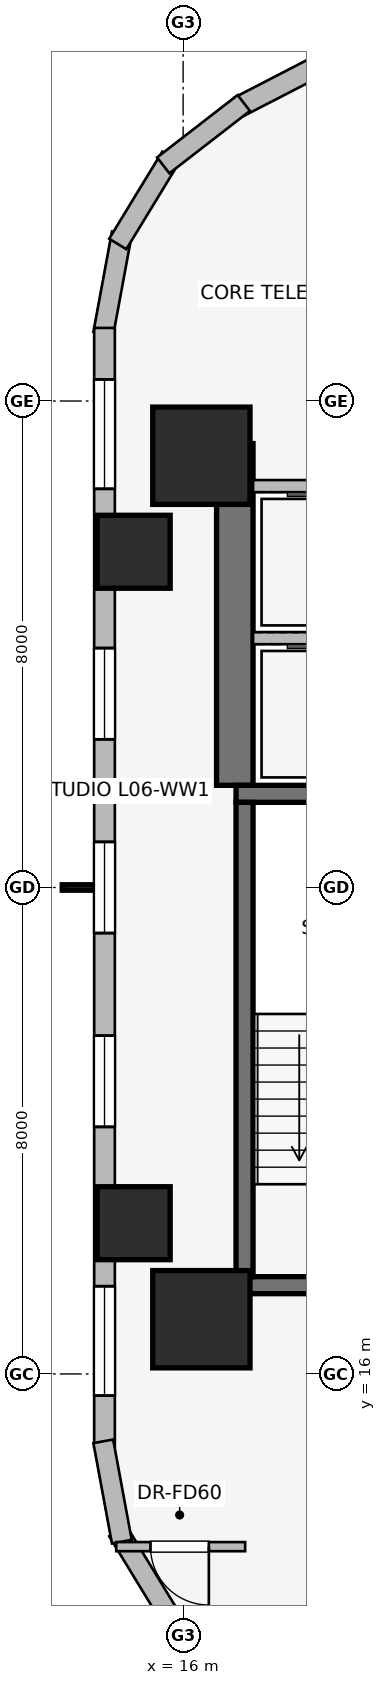
"""IFC4 building model, lengths in metres.
Left out: names, types, materials, properties, quantities, classifications, styles, units other than length and angle.
Written with IfcOpenShell. Run it as: python <this file> out.ifc"""

import sys

from ifc_helpers import new_model, si_unit, direction, frame, frame_2d, origin, origin_2d, place, context, subcontext, project, spatial, rectangle, extrude, element, fill, save


model = new_model("IFC4")
c1 = context("Model", 3, precision=1e-05, world=origin(), true_north=direction((0.0, 1.0)))
c2 = subcontext(c1, "Body", "Model", "MODEL_VIEW")
j1 = project(units=[si_unit("LENGTHUNIT", "METRE"), si_unit("PLANEANGLEUNIT", "RADIAN")], contexts=[c1])
p1 = place(None, origin())
s1 = spatial("IfcSite", under=j1, at=p1, CompositionType="ELEMENT")
p2 = place(p1, origin())
s2 = spatial("IfcBuilding", under=s1, at=p2, CompositionType="ELEMENT")
p3 = place(p2, frame((0.0, 0.0, 27.0)))
s3 = spatial("IfcBuildingStorey", under=s2, at=p3, CompositionType="ELEMENT", Elevation=27.0)
p4 = place(p3, frame((16.85, 25.68, 0.0), z_axis=(0.0, 0.0, 1.0), x_axis=(0.0, 1.0, 0.0)))
e1 = element("IfcWall", 1, at=p4, inside=s3, PredefinedType="SHEAR", context=c2, shape_type="SweptSolid", body=[
    extrude(rectangle(XDim=5.62, YDim=0.6, at=frame_2d((2.81, 0.0))), origin(), (0.0, 0.0, 1.0), 3.65),
])
for number, where, z_axis, x_axis in (
    (2, (16.87, 17.46, 0.0), (0.0, 0.0, 1.0), (1.0, 0.0, 0.0)),
    (3, (20.63, 25.54, 0.0), (0.0, 0.0, 1.0), (-1.0, 0.0, 0.0)),
):
    element("IfcWall", number, at=place(p3, frame(where, z_axis=z_axis, x_axis=x_axis)), inside=s3, PredefinedType="SHEAR", context=c2, shape_type="SweptSolid", body=[
        extrude(rectangle(XDim=3.76, YDim=0.28, at=frame_2d((1.88, 0.0))), origin(), (0.0, 0.0, 1.0), 3.65),
    ])
p5 = place(p3, frame((17.01, 25.4, 0.0), z_axis=(0.0, 0.0, 1.0), x_axis=(0.0, -1.0, 0.0)))
e4 = element("IfcWall", 4, at=p5, inside=s3, PredefinedType="SHEAR", context=c2, shape_type="SweptSolid", body=[
    extrude(rectangle(XDim=7.8, YDim=0.28, at=frame_2d((3.9, 0.0))), origin(), (0.0, 0.0, 1.0), 3.65),
])
for number, where, z_axis, x_axis in (
    (5, (16.3, 16.9, 0.0), (0.0, 0.0, 1.0), (1.0, 0.0, 0.0)),
    (6, (16.3, 31.1, 0.0), (0.0, 0.0, 1.0), (1.0, 0.0, 0.0)),
):
    element("IfcColumn", number, at=place(p3, frame(where, z_axis=z_axis, x_axis=x_axis)), inside=s3, PredefinedType="COLUMN", context=c2, shape_type="SweptSolid", body=[
        extrude(rectangle(XDim=1.6, YDim=1.6, at=origin_2d()), origin(), (0.0, 0.0, 1.0), 3.65),
    ])
for number, where, z_axis, x_axis in (
    (7, (15.187, 29.521, -0.42), (0.0, 0.0, 1.0), (1.0, 0.0, 0.0)),
    (8, (15.187, 18.479, -0.42), (0.0, 0.0, 1.0), (1.0, 0.0, 0.0)),
):
    element("IfcColumn", number, at=place(p3, frame(where, z_axis=z_axis, x_axis=x_axis)), inside=s3, PredefinedType="COLUMN", context=c2, shape_type="SweptSolid", body=[
        extrude(rectangle(XDim=1.2, YDim=1.2, at=origin_2d()), origin(), (0.0, 0.0, 1.0), 4.07),
    ])
p6 = place(p3, frame((16.924, 36.841, 0.0), z_axis=(0.0, 0.0, 1.0), x_axis=(0.888634413993, 0.458616264721, 0.0)))
e9 = element("IfcWall", 9, at=p6, inside=s3, PredefinedType="STANDARD", context=c2, shape_type="SweptSolid", body=[
    extrude(rectangle(XDim=20.531, YDim=0.34, at=frame_2d((10.266, 0.0))), origin(), (0.0, 0.0, 1.0), 2.684),
])
p7 = place(p6, frame((2.161, 0.0, 0.75)))
e10 = element("IfcOpeningElement", 10, at=p7, cuts=e9, PredefinedType="OPENING", context=c2, shape_type="SweptSolid", body=[
    extrude(rectangle(XDim=1.05, YDim=1.4, at=frame_2d((0.525, 0.7))), frame((0.0, 0.18, 0.0), z_axis=(0.0, -1.0, 0.0), x_axis=(1.0, 0.0, 0.0)), (0.0, 0.0, 1.0), 0.36),
])
p8 = place(p6, frame((5.903, 0.0, 0.75)))
e11 = element("IfcOpeningElement", 11, at=p8, cuts=e9, PredefinedType="OPENING", context=c2, shape_type="SweptSolid", body=[
    extrude(rectangle(XDim=1.5, YDim=1.5, at=frame_2d((0.75, 0.75))), frame((0.0, 0.18, 0.0), z_axis=(0.0, -1.0, 0.0), x_axis=(1.0, 0.0, 0.0)), (0.0, 0.0, 1.0), 0.36),
])
p9 = place(p6, frame((9.516, 0.0, 0.75)))
e12 = element("IfcOpeningElement", 12, at=p9, cuts=e9, PredefinedType="OPENING", context=c2, shape_type="SweptSolid", body=[
    extrude(rectangle(XDim=1.5, YDim=1.5, at=frame_2d((0.75, 0.75))), frame((0.0, 0.18, 0.0), z_axis=(0.0, -1.0, 0.0), x_axis=(1.0, 0.0, 0.0)), (0.0, 0.0, 1.0), 0.36),
])
p10 = place(p6, frame((13.129, 0.0, 0.75)))
e13 = element("IfcOpeningElement", 13, at=p10, cuts=e9, PredefinedType="OPENING", context=c2, shape_type="SweptSolid", body=[
    extrude(rectangle(XDim=1.5, YDim=1.5, at=frame_2d((0.75, 0.75))), frame((0.0, 0.18, 0.0), z_axis=(0.0, -1.0, 0.0), x_axis=(1.0, 0.0, 0.0)), (0.0, 0.0, 1.0), 0.36),
])
p11 = place(p6, frame((17.476, 0.0, 0.75)))
e14 = element("IfcOpeningElement", 14, at=p11, cuts=e9, PredefinedType="OPENING", context=c2, shape_type="SweptSolid", body=[
    extrude(rectangle(XDim=1.05, YDim=1.4, at=frame_2d((0.525, 0.7))), frame((0.0, 0.18, 0.0), z_axis=(0.0, -1.0, 0.0), x_axis=(1.0, 0.0, 0.0)), (0.0, 0.0, 1.0), 0.36),
])
p12 = place(p3, frame((14.687, 33.108, 0.0), z_axis=(0.0, 0.0, 1.0), x_axis=(0.181714143354, 0.983351397063, 0.0)))
e15 = element("IfcWall", 15, at=p12, inside=s3, PredefinedType="STANDARD", context=c2, shape_type="SweptSolid", body=[
    extrude(rectangle(XDim=1.678, YDim=0.33, at=frame_2d((0.839, 0.0))), origin(), (0.0, 0.0, 1.0), 3.39),
])
p13 = place(p3, frame((14.925, 34.583, 0.0), z_axis=(0.0, 0.0, 1.0), x_axis=(0.520584129191, 0.853810379671, 0.0)))
e16 = element("IfcWall", 16, at=p13, inside=s3, PredefinedType="STANDARD", context=c2, shape_type="SweptSolid", body=[
    extrude(rectangle(XDim=1.677, YDim=0.33, at=frame_2d((0.838, 0.0))), origin(), (0.0, 0.0, 1.0), 3.39),
])
p14 = place(p3, frame((15.673, 35.875, 0.0), z_axis=(0.0, 0.0, 1.0), x_axis=(0.790691856293, 0.61221433207, 0.0)))
e17 = element("IfcWall", 17, at=p14, inside=s3, PredefinedType="STANDARD", context=c2, shape_type="SweptSolid", body=[
    extrude(rectangle(XDim=1.676, YDim=0.33, at=frame_2d((0.838, 0.0))), origin(), (0.0, 0.0, 1.0), 3.39),
])
p15 = place(p3, frame((14.707, 14.798, 0.0), z_axis=(0.0, 0.0, 1.0), x_axis=(0.0, 1.0, 0.0)))
e18 = element("IfcWall", 18, at=p15, inside=s3, PredefinedType="STANDARD", context=c2, shape_type="SweptSolid", body=[
    extrude(rectangle(XDim=18.404, YDim=0.34, at=frame_2d((9.202, 0.0))), origin(), (0.0, 0.0, 1.0), 2.684),
])
p16 = place(p15, frame((0.845, 0.0, 0.75)))
e19 = element("IfcOpeningElement", 19, at=p16, cuts=e18, PredefinedType="OPENING", context=c2, shape_type="SweptSolid", body=[
    extrude(rectangle(XDim=1.8, YDim=1.5, at=frame_2d((0.9, 0.75))), frame((0.0, 0.18, 0.0), z_axis=(0.0, -1.0, 0.0), x_axis=(1.0, 0.0, 0.0)), (0.0, 0.0, 1.0), 0.36),
])
p17 = place(p15, frame((5.265, 0.0, 0.75)))
e20 = element("IfcOpeningElement", 20, at=p17, cuts=e18, PredefinedType="OPENING", context=c2, shape_type="SweptSolid", body=[
    extrude(rectangle(XDim=1.5, YDim=1.5, at=frame_2d((0.75, 0.75))), frame((0.0, 0.18, 0.0), z_axis=(0.0, -1.0, 0.0), x_axis=(1.0, 0.0, 0.0)), (0.0, 0.0, 1.0), 0.36),
])
p18 = place(p15, frame((8.452, 0.0, 0.75)))
e21 = element("IfcOpeningElement", 21, at=p18, cuts=e18, PredefinedType="OPENING", context=c2, shape_type="SweptSolid", body=[
    extrude(rectangle(XDim=1.5, YDim=1.5, at=frame_2d((0.75, 0.75))), frame((0.0, 0.18, 0.0), z_axis=(0.0, -1.0, 0.0), x_axis=(1.0, 0.0, 0.0)), (0.0, 0.0, 1.0), 0.36),
])
p19 = place(p15, frame((11.639, 0.0, 0.75)))
e22 = element("IfcOpeningElement", 22, at=p19, cuts=e18, PredefinedType="OPENING", context=c2, shape_type="SweptSolid", body=[
    extrude(rectangle(XDim=1.5, YDim=1.5, at=frame_2d((0.75, 0.75))), frame((0.0, 0.18, 0.0), z_axis=(0.0, -1.0, 0.0), x_axis=(1.0, 0.0, 0.0)), (0.0, 0.0, 1.0), 0.36),
])
p20 = place(p15, frame((15.758, 0.0, 0.75)))
e23 = element("IfcOpeningElement", 23, at=p20, cuts=e18, PredefinedType="OPENING", context=c2, shape_type="SweptSolid", body=[
    extrude(rectangle(XDim=1.8, YDim=1.5, at=frame_2d((0.9, 0.75))), frame((0.0, 0.18, 0.0), z_axis=(0.0, -1.0, 0.0), x_axis=(1.0, 0.0, 0.0)), (0.0, 0.0, 1.0), 0.36),
])
p21 = place(p3, frame((16.998, 11.099, 0.0), z_axis=(0.0, 0.0, 1.0), x_axis=(-0.790691856293, 0.61221433207, 0.0)))
e24 = element("IfcWall", 24, at=p21, inside=s3, PredefinedType="STANDARD", context=c2, shape_type="SweptSolid", body=[
    extrude(rectangle(XDim=1.676, YDim=0.33, at=frame_2d((0.838, 0.0))), origin(), (0.0, 0.0, 1.0), 3.39),
])
p22 = place(p3, frame((15.798, 11.985, 0.0), z_axis=(0.0, 0.0, 1.0), x_axis=(-0.520584129191, 0.853810379671, 0.0)))
e25 = element("IfcWall", 25, at=p22, inside=s3, PredefinedType="STANDARD", context=c2, shape_type="SweptSolid", body=[
    extrude(rectangle(XDim=1.677, YDim=0.33, at=frame_2d((0.838, 0.0))), origin(), (0.0, 0.0, 1.0), 3.39),
])
p23 = place(p3, frame((14.992, 13.242, 0.0), z_axis=(0.0, 0.0, 1.0), x_axis=(-0.181714143354, 0.983351397063, 0.0)))
e26 = element("IfcWall", 26, at=p23, inside=s3, PredefinedType="STANDARD", context=c2, shape_type="SweptSolid", body=[
    extrude(rectangle(XDim=1.678, YDim=0.33, at=frame_2d((0.839, 0.0))), origin(), (0.0, 0.0, 1.0), 3.39),
])
p24 = place(p3, frame((17.15, 28.1, 0.0), z_axis=(0.0, 0.0, 1.0), x_axis=(1.0, 0.0, 0.0)))
e27 = element("IfcWall", 27, at=p24, inside=s3, PredefinedType="PARTITIONING", context=c2, shape_type="SweptSolid", body=[
    extrude(rectangle(XDim=2.5, YDim=0.2, at=frame_2d((1.25, 0.0))), origin(), (0.0, 0.0, 1.0), 3.39),
])
p25 = place(p3, frame((19.65, 30.6, 0.0), z_axis=(0.0, 0.0, 1.0), x_axis=(-1.0, 0.0, 0.0)))
e28 = element("IfcWall", 28, at=p25, inside=s3, PredefinedType="PARTITIONING", context=c2, shape_type="SweptSolid", body=[
    extrude(rectangle(XDim=2.5, YDim=0.2, at=frame_2d((1.25, 0.0))), origin(), (0.0, 0.0, 1.0), 2.29),
])
p26 = place(p3, frame((17.02, 13.16, 0.0), z_axis=(0.0, 0.0, 1.0), x_axis=(-1.0, 0.0, 0.0)))
e29 = element("IfcWall", 29, at=p26, inside=s3, PredefinedType="PARTITIONING", context=c2, shape_type="SweptSolid", body=[
    extrude(rectangle(XDim=2.12, YDim=0.15, at=frame_2d((1.06, 0.0))), origin(), (0.0, 0.0, 1.0), 3.39),
])
p27 = place(p26, frame((0.597, 0.0, 0.0)))
e30 = element("IfcOpeningElement", 30, at=p27, cuts=e29, PredefinedType="OPENING", context=c2, shape_type="SweptSolid", body=[
    extrude(rectangle(XDim=0.96, YDim=2.0, at=frame_2d((0.48, 1.0))), frame((0.0, 0.085, 0.0), z_axis=(0.0, -1.0, 0.0), x_axis=(1.0, 0.0, 0.0)), (0.0, 0.0, 1.0), 0.17),
])
p28 = place(p16, origin())
e31 = element("IfcWindow", 31, at=p28, inside=s3, PartitioningType="SINGLE_PANEL", PredefinedType="WINDOW", context=c2, shape_type="SweptSolid", body=[
    extrude(rectangle(XDim=1.8, YDim=1.5, at=frame_2d((0.9, 0.75))), frame((0.0, 0.03, 0.0), z_axis=(0.0, -1.0, 0.0), x_axis=(1.0, 0.0, 0.0)), (0.0, 0.0, 1.0), 0.06),
])
fill(e19, e31)
p29 = place(p17, origin())
e32 = element("IfcWindow", 32, at=p29, inside=s3, PartitioningType="SINGLE_PANEL", PredefinedType="WINDOW", context=c2, shape_type="SweptSolid", body=[
    extrude(rectangle(XDim=1.5, YDim=1.5, at=frame_2d((0.75, 0.75))), frame((0.0, 0.03, 0.0), z_axis=(0.0, -1.0, 0.0), x_axis=(1.0, 0.0, 0.0)), (0.0, 0.0, 1.0), 0.06),
])
fill(e20, e32)
p30 = place(p18, origin())
e33 = element("IfcWindow", 33, at=p30, inside=s3, PartitioningType="SINGLE_PANEL", PredefinedType="WINDOW", context=c2, shape_type="SweptSolid", body=[
    extrude(rectangle(XDim=1.5, YDim=1.5, at=frame_2d((0.75, 0.75))), frame((0.0, 0.03, 0.0), z_axis=(0.0, -1.0, 0.0), x_axis=(1.0, 0.0, 0.0)), (0.0, 0.0, 1.0), 0.06),
])
fill(e21, e33)
p31 = place(p19, origin())
e34 = element("IfcWindow", 34, at=p31, inside=s3, PartitioningType="SINGLE_PANEL", PredefinedType="WINDOW", context=c2, shape_type="SweptSolid", body=[
    extrude(rectangle(XDim=1.5, YDim=1.5, at=frame_2d((0.75, 0.75))), frame((0.0, 0.03, 0.0), z_axis=(0.0, -1.0, 0.0), x_axis=(1.0, 0.0, 0.0)), (0.0, 0.0, 1.0), 0.06),
])
fill(e22, e34)
p32 = place(p20, origin())
e35 = element("IfcWindow", 35, at=p32, inside=s3, PartitioningType="SINGLE_PANEL", PredefinedType="WINDOW", context=c2, shape_type="SweptSolid", body=[
    extrude(rectangle(XDim=1.8, YDim=1.5, at=frame_2d((0.9, 0.75))), frame((0.0, 0.03, 0.0), z_axis=(0.0, -1.0, 0.0), x_axis=(1.0, 0.0, 0.0)), (0.0, 0.0, 1.0), 0.06),
])
fill(e23, e35)
p33 = place(p27, origin())
e36 = element("IfcDoor", 36, at=p33, inside=s3, OperationType="SINGLE_SWING_LEFT", PredefinedType="DOOR", context=c2, shape_type="SweptSolid", body=[
    extrude(rectangle(XDim=0.96, YDim=2.0, at=frame_2d((0.48, 1.0))), frame((0.0, 0.025, 0.0), z_axis=(0.0, -1.0, 0.0), x_axis=(1.0, 0.0, 0.0)), (0.0, 0.0, 1.0), 0.05),
])
fill(e30, e36)
save(model, sys.argv[1])
